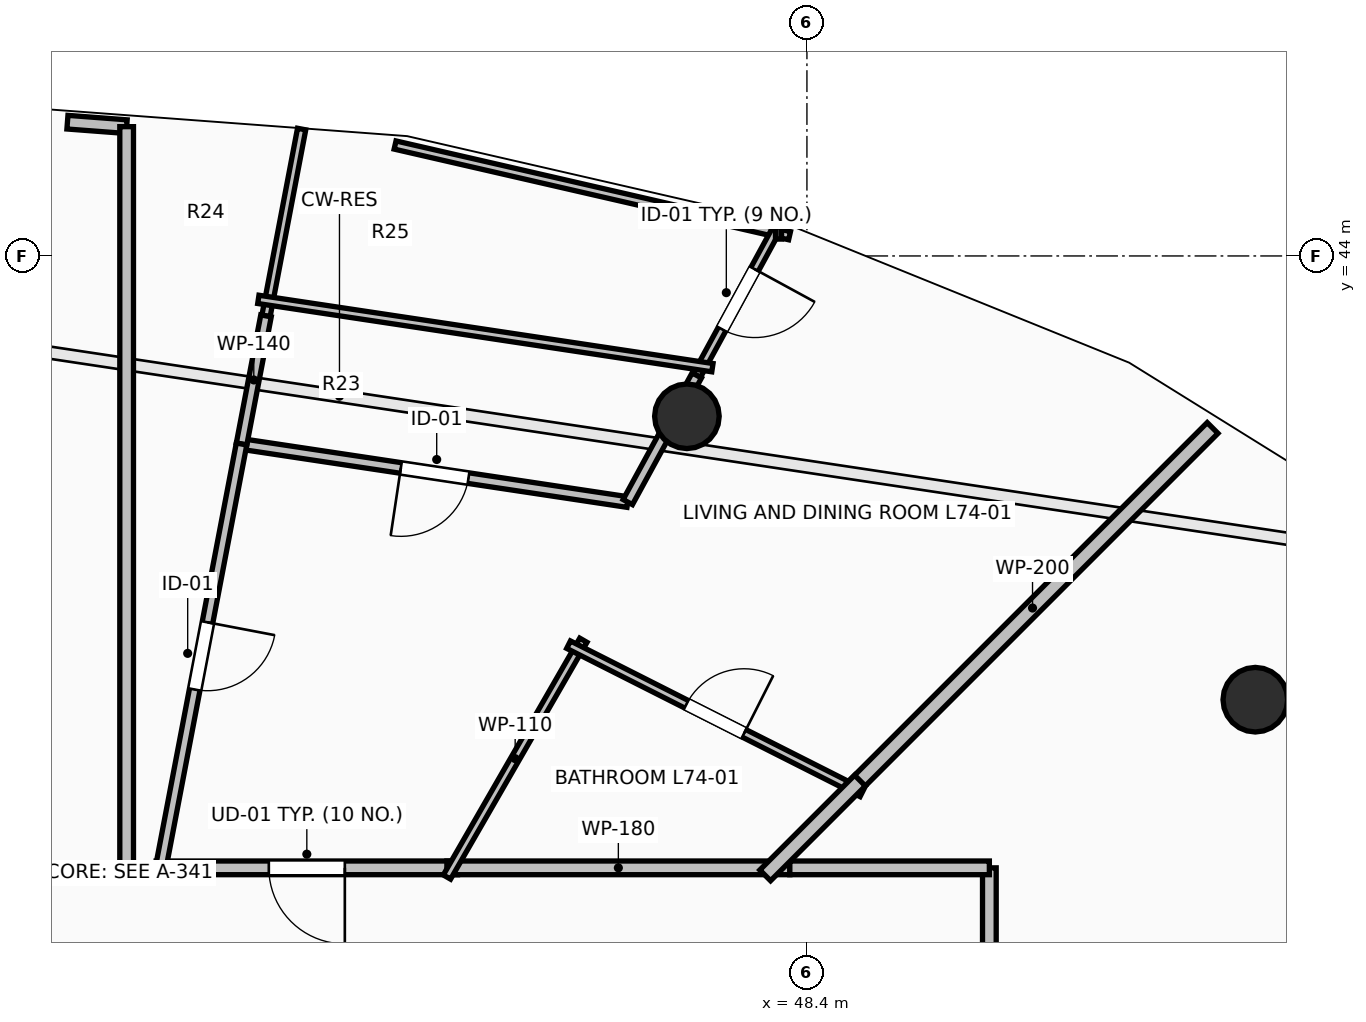
"""IFC4 building model, lengths in metres.
Left out: names, types, materials, properties, quantities, classifications, styles, units other than length and angle.
Written with IfcOpenShell. Run it as: python <this file> out.ifc"""

import sys

from ifc_helpers import new_model, si_unit, direction, frame, frame_2d, origin, origin_2d, place, context, subcontext, project, spatial, rectangle, circle, extrude, element, fill, save


model = new_model("IFC4")
c1 = context("Model", 3, precision=1e-05, world=origin(), true_north=direction((0.0, 1.0)))
c2 = subcontext(c1, "Body", "Model", "MODEL_VIEW")
j1 = project(units=[si_unit("LENGTHUNIT", "METRE"), si_unit("PLANEANGLEUNIT", "RADIAN")], contexts=[c1])
p1 = place(None, origin())
s1 = spatial("IfcSite", under=j1, at=p1, CompositionType="ELEMENT")
p2 = place(p1, origin())
s2 = spatial("IfcBuilding", under=s1, at=p2, CompositionType="ELEMENT")
p3 = place(p2, frame((0.0, 0.0, 273.3)))
s3 = spatial("IfcBuildingStorey", under=s2, at=p3, CompositionType="ELEMENT", Elevation=273.3)
for number, where, z_axis, x_axis in (
    (1, (54.299, 38.162, 0.0), (0.0, 0.0, 1.0), (0.707, 0.707, 0.0)),
    (2, (46.821, 41.891, 0.0), (0.0, 0.0, 1.0), (0.383, 0.924, 0.0)),
):
    element("IfcColumn", number, at=place(p3, frame(where, z_axis=z_axis, x_axis=x_axis)), inside=s3, PredefinedType="COLUMN", context=c2, shape_type="SweptSolid", body=[
        extrude(circle(Radius=0.425, at=origin_2d()), origin(), (0.0, 0.0, 1.0), 3.55),
    ])
p4 = place(p3, frame((43.803, 35.95, 0.0), z_axis=(0.0, 0.0, 1.0), x_axis=(-1.0, 0.0, 0.0)))
e3 = element("IfcWall", 3, at=p4, inside=s3, PredefinedType="PARTITIONING", context=c2, shape_type="SweptSolid", body=[
    extrude(rectangle(XDim=3.965, YDim=0.18, at=frame_2d((1.982, 0.0))), origin(), (0.0, 0.0, 1.0), 2.924),
])
p5 = place(p4, frame((1.482, 0.0, 0.0)))
e4 = element("IfcOpeningElement", 4, at=p5, cuts=e3, PredefinedType="OPENING", context=c2, shape_type="SweptSolid", body=[
    extrude(rectangle(XDim=1.0, YDim=2.15, at=frame_2d((0.5, 1.075))), frame((0.0, 0.105, 0.0), z_axis=(0.0, -1.0, 0.0), x_axis=(1.0, 0.0, 0.0)), (0.0, 0.0, 1.0), 0.21),
])
p6 = place(p3, frame((48.175, 35.95, 0.0), z_axis=(0.0, 0.0, 1.0), x_axis=(-1.0, 0.0, 0.0)))
e5 = element("IfcWall", 5, at=p6, inside=s3, PredefinedType="PARTITIONING", context=c2, shape_type="SweptSolid", body=[
    extrude(rectangle(XDim=4.512, YDim=0.18, at=frame_2d((2.256, 0.0))), origin(), (0.0, 0.0, 1.0), 2.482),
])
p7 = place(p3, frame((39.45, 45.701, 0.0), z_axis=(0.0, 0.0, 1.0), x_axis=(-0.997136622012, 0.0756211415, 0.0)))
e6 = element("IfcWall", 6, at=p7, inside=s3, PredefinedType="PARTITIONING", context=c2, shape_type="SweptSolid", body=[
    extrude(rectangle(XDim=0.781, YDim=0.18, at=frame_2d((0.391, 0.0))), origin(), (0.0, 0.0, 1.0), 3.29),
])
p8 = place(p3, frame((39.45, 35.95, 0.0), z_axis=(0.0, 0.0, 1.0), x_axis=(0.0, 1.0, 0.0)))
e7 = element("IfcWall", 7, at=p8, inside=s3, PredefinedType="PARTITIONING", context=c2, shape_type="SweptSolid", body=[
    extrude(rectangle(XDim=9.751, YDim=0.18, at=frame_2d((4.875, 0.0))), origin(), (0.0, 0.0, 1.0), 2.874),
])
p9 = place(p3, frame((50.8, 26.06, 0.0), z_axis=(0.0, 0.0, 1.0), x_axis=(0.0, 1.0, 0.0)))
e8 = element("IfcWall", 8, at=p9, inside=s3, PredefinedType="PARTITIONING", context=c2, shape_type="SweptSolid", body=[
    extrude(rectangle(XDim=9.89, YDim=0.18, at=frame_2d((4.945, 0.0))), origin(), (0.0, 0.0, 1.0), 2.482),
])
p10 = place(p9, frame((4.445, 0.0, 0.0)))
e9 = element("IfcOpeningElement", 9, at=p10, cuts=e8, PredefinedType="OPENING", context=c2, shape_type="SweptSolid", body=[
    extrude(rectangle(XDim=1.0, YDim=2.15, at=frame_2d((0.5, 1.075))), frame((0.0, 0.105, 0.0), z_axis=(0.0, -1.0, 0.0), x_axis=(1.0, 0.0, 0.0)), (0.0, 0.0, 1.0), 0.21),
])
p11 = place(p3, frame((50.8, 35.95, 0.0), z_axis=(0.0, 0.0, 1.0), x_axis=(-1.0, 0.0, 0.0)))
e10 = element("IfcWall", 10, at=p11, inside=s3, PredefinedType="PARTITIONING", context=c2, shape_type="SweptSolid", body=[
    extrude(rectangle(XDim=2.625, YDim=0.18, at=frame_2d((1.312, 0.0))), origin(), (0.0, 0.0, 1.0), 2.482),
])
p12 = place(p3, frame((43.664, 35.829, 0.0), z_axis=(0.0, 0.0, 1.0), x_axis=(0.49917767271, 0.866499654396, 0.0)))
e11 = element("IfcWall", 11, at=p12, inside=s3, PredefinedType="PARTITIONING", context=c2, shape_type="SweptSolid", body=[
    extrude(rectangle(XDim=3.596, YDim=0.11, at=frame_2d((1.798, 0.0))), origin(), (0.0, 0.0, 1.0), 2.924),
])
p13 = place(p3, frame((45.264, 38.886, 0.0), z_axis=(0.0, 0.0, 1.0), x_axis=(0.892556527512, -0.450935522216, 0.0)))
e12 = element("IfcWall", 12, at=p13, inside=s3, PredefinedType="PARTITIONING", context=c2, shape_type="SweptSolid", body=[
    extrude(rectangle(XDim=4.325, YDim=0.11, at=frame_2d((2.162, 0.0))), origin(), (0.0, 0.0, 1.0), 2.482),
])
p14 = place(p13, frame((1.737, 0.0, 0.0)))
e13 = element("IfcOpeningElement", 13, at=p14, cuts=e12, PredefinedType="OPENING", context=c2, shape_type="SweptSolid", body=[
    extrude(rectangle(XDim=0.85, YDim=2.1, at=frame_2d((0.425, 1.05))), frame((0.0, 0.07, 0.0), z_axis=(0.0, -1.0, 0.0), x_axis=(1.0, 0.0, 0.0)), (0.0, 0.0, 1.0), 0.14),
])
p15 = place(p3, frame((41.284, 43.211, 0.0), z_axis=(0.0, 0.0, 1.0), x_axis=(0.187233159216, 0.982315501298, 0.0)))
e14 = element("IfcWall", 14, at=p15, inside=s3, PredefinedType="PARTITIONING", context=c2, shape_type="SweptSolid", body=[
    extrude(rectangle(XDim=2.502, YDim=0.11, at=frame_2d((1.251, 0.0))), origin(), (0.0, 0.0, 1.0), 3.29),
])
p16 = place(p3, frame((48.171, 44.267, 0.0), z_axis=(0.0, 0.0, 1.0), x_axis=(-0.974586324437, 0.224012268015, 0.0)))
e15 = element("IfcWall", 15, at=p16, inside=s3, PredefinedType="PARTITIONING", context=c2, shape_type="SweptSolid", body=[
    extrude(rectangle(XDim=5.325, YDim=0.11, at=frame_2d((2.663, 0.0))), origin(), (0.0, 0.0, 1.0), 3.29),
])
p17 = place(p3, frame((48.044, 44.434, 0.0), z_axis=(0.0, 0.0, 1.0), x_axis=(-0.478485169604, -0.878095634011, 0.0)))
e16 = element("IfcWall", 16, at=p17, inside=s3, PredefinedType="PARTITIONING", context=c2, shape_type="SweptSolid", body=[
    extrude(rectangle(XDim=2.284, YDim=0.11, at=frame_2d((1.142, 0.0))), origin(), (0.0, 0.0, 1.0), 3.29),
])
p18 = place(p17, frame((0.692, 0.0, 0.0)))
e17 = element("IfcOpeningElement", 17, at=p18, cuts=e16, PredefinedType="OPENING", context=c2, shape_type="SweptSolid", body=[
    extrude(rectangle(XDim=0.9, YDim=2.1, at=frame_2d((0.45, 1.05))), frame((0.0, 0.07, 0.0), z_axis=(0.0, -1.0, 0.0), x_axis=(1.0, 0.0, 0.0)), (0.0, 0.0, 1.0), 0.14),
])
p19 = place(p3, frame((46.043, 40.762, 0.0), z_axis=(0.0, 0.0, 1.0), x_axis=(-0.988886109078, 0.148675025721, 0.0)))
e18 = element("IfcWall", 18, at=p19, inside=s3, PredefinedType="PARTITIONING", context=c2, shape_type="SweptSolid", body=[
    extrude(rectangle(XDim=5.138, YDim=0.14, at=frame_2d((2.569, 0.0))), origin(), (0.0, 0.0, 1.0), 3.29),
])
p20 = place(p19, frame((2.119, 0.0, 0.0)))
e19 = element("IfcOpeningElement", 19, at=p20, cuts=e18, PredefinedType="OPENING", context=c2, shape_type="SweptSolid", body=[
    extrude(rectangle(XDim=0.9, YDim=2.1, at=frame_2d((0.45, 1.05))), frame((0.0, 0.085, 0.0), z_axis=(0.0, -1.0, 0.0), x_axis=(1.0, 0.0, 0.0)), (0.0, 0.0, 1.0), 0.17),
])
p21 = place(p3, frame((40.962, 41.526, 0.0), z_axis=(0.0, 0.0, 1.0), x_axis=(0.187353972187, 0.982292466176, 0.0)))
e20 = element("IfcWall", 20, at=p21, inside=s3, PredefinedType="PARTITIONING", context=c2, shape_type="SweptSolid", body=[
    extrude(rectangle(XDim=1.716, YDim=0.14, at=frame_2d((0.858, 0.0))), origin(), (0.0, 0.0, 1.0), 2.874),
])
p22 = place(p3, frame((46.951, 42.428, 0.0), z_axis=(0.0, 0.0, 1.0), x_axis=(-0.478536562944, -0.878067627194, 0.0)))
e21 = element("IfcWall", 21, at=p22, inside=s3, PredefinedType="PARTITIONING", context=c2, shape_type="SweptSolid", body=[
    extrude(rectangle(XDim=1.897, YDim=0.14, at=frame_2d((0.949, 0.0))), origin(), (0.0, 0.0, 1.0), 3.29),
])
p23 = place(p3, frame((40.962, 41.526, 0.0), z_axis=(0.0, 0.0, 1.0), x_axis=(-0.18743226397, -0.982277530244, 0.0)))
e22 = element("IfcWall", 22, at=p23, inside=s3, PredefinedType="PARTITIONING", context=c2, shape_type="SweptSolid", body=[
    extrude(rectangle(XDim=5.677, YDim=0.14, at=frame_2d((2.838, 0.0))), origin(), (0.0, 0.0, 1.0), 2.924),
])
p24 = place(p23, frame((2.388, 0.0, 0.0)))
e23 = element("IfcOpeningElement", 23, at=p24, cuts=e22, PredefinedType="OPENING", context=c2, shape_type="SweptSolid", body=[
    extrude(rectangle(XDim=0.9, YDim=2.1, at=frame_2d((0.45, 1.05))), frame((0.0, 0.085, 0.0), z_axis=(0.0, -1.0, 0.0), x_axis=(1.0, 0.0, 0.0)), (0.0, 0.0, 1.0), 0.17),
])
p25 = place(p3, frame((48.999, 36.999, 0.0), z_axis=(0.0, 0.0, 1.0), x_axis=(0.707106781187, 0.707106781187, 0.0)))
e24 = element("IfcWall", 24, at=p25, inside=s3, PredefinedType="PARTITIONING", context=c2, shape_type="SweptSolid", body=[
    extrude(rectangle(XDim=6.701, YDim=0.2, at=frame_2d((3.35, 0.0))), origin(), (0.0, 0.0, 1.0), 2.874),
])
p26 = place(p3, frame((47.851, 35.851, 0.0), z_axis=(0.0, 0.0, 1.0), x_axis=(0.707106781187, 0.707106781187, 0.0)))
e25 = element("IfcWall", 25, at=p26, inside=s3, PredefinedType="PARTITIONING", context=c2, shape_type="SweptSolid", body=[
    extrude(rectangle(XDim=1.763, YDim=0.2, at=frame_2d((0.882, 0.0))), origin(), (0.0, 0.0, 1.0), 2.482),
])
p27 = place(p3, frame((41.183, 43.429, 0.0), z_axis=(0.0, 0.0, 1.0), x_axis=(0.988879067965, -0.148721850918, 0.0)))
e26 = element("IfcWall", 26, at=p27, inside=s3, PredefinedType="PARTITIONING", context=c2, shape_type="SweptSolid", body=[
    extrude(rectangle(XDim=6.041, YDim=0.11, at=frame_2d((3.021, 0.0))), origin(), (0.0, 0.0, 1.0), 3.29),
])
p28 = place(p5, origin())
e27 = element("IfcDoor", 27, at=p28, inside=s3, OperationType="SINGLE_SWING_LEFT", PredefinedType="DOOR", context=c2, shape_type="SweptSolid", body=[
    extrude(rectangle(XDim=1.0, YDim=2.15, at=frame_2d((0.5, 1.075))), frame((0.0, 0.025, 0.0), z_axis=(0.0, -1.0, 0.0), x_axis=(1.0, 0.0, 0.0)), (0.0, 0.0, 1.0), 0.05),
])
fill(e4, e27)
p29 = place(p14, origin())
e28 = element("IfcDoor", 28, at=p29, inside=s3, OperationType="SINGLE_SWING_RIGHT", PredefinedType="DOOR", context=c2, shape_type="SweptSolid", body=[
    extrude(rectangle(XDim=0.85, YDim=2.1, at=frame_2d((0.425, 1.05))), frame((0.0, 0.025, 0.0), z_axis=(0.0, -1.0, 0.0), x_axis=(1.0, 0.0, 0.0)), (0.0, 0.0, 1.0), 0.05),
])
fill(e13, e28)
p30 = place(p18, origin())
e29 = element("IfcDoor", 29, at=p30, inside=s3, OperationType="SINGLE_SWING_LEFT", PredefinedType="DOOR", context=c2, shape_type="SweptSolid", body=[
    extrude(rectangle(XDim=0.9, YDim=2.1, at=frame_2d((0.45, 1.05))), frame((0.0, 0.025, 0.0), z_axis=(0.0, -1.0, 0.0), x_axis=(1.0, 0.0, 0.0)), (0.0, 0.0, 1.0), 0.05),
])
fill(e17, e29)
p31 = place(p20, origin())
e30 = element("IfcDoor", 30, at=p31, inside=s3, OperationType="SINGLE_SWING_RIGHT", PredefinedType="DOOR", context=c2, shape_type="SweptSolid", body=[
    extrude(rectangle(XDim=0.9, YDim=2.1, at=frame_2d((0.45, 1.05))), frame((0.0, 0.025, 0.0), z_axis=(0.0, -1.0, 0.0), x_axis=(1.0, 0.0, 0.0)), (0.0, 0.0, 1.0), 0.05),
])
fill(e19, e30)
p32 = place(p24, origin())
e31 = element("IfcDoor", 31, at=p32, inside=s3, OperationType="SINGLE_SWING_LEFT", PredefinedType="DOOR", context=c2, shape_type="SweptSolid", body=[
    extrude(rectangle(XDim=0.9, YDim=2.1, at=frame_2d((0.45, 1.05))), frame((0.0, 0.025, 0.0), z_axis=(0.0, -1.0, 0.0), x_axis=(1.0, 0.0, 0.0)), (0.0, 0.0, 1.0), 0.05),
])
fill(e23, e31)
save(model, sys.argv[1])
